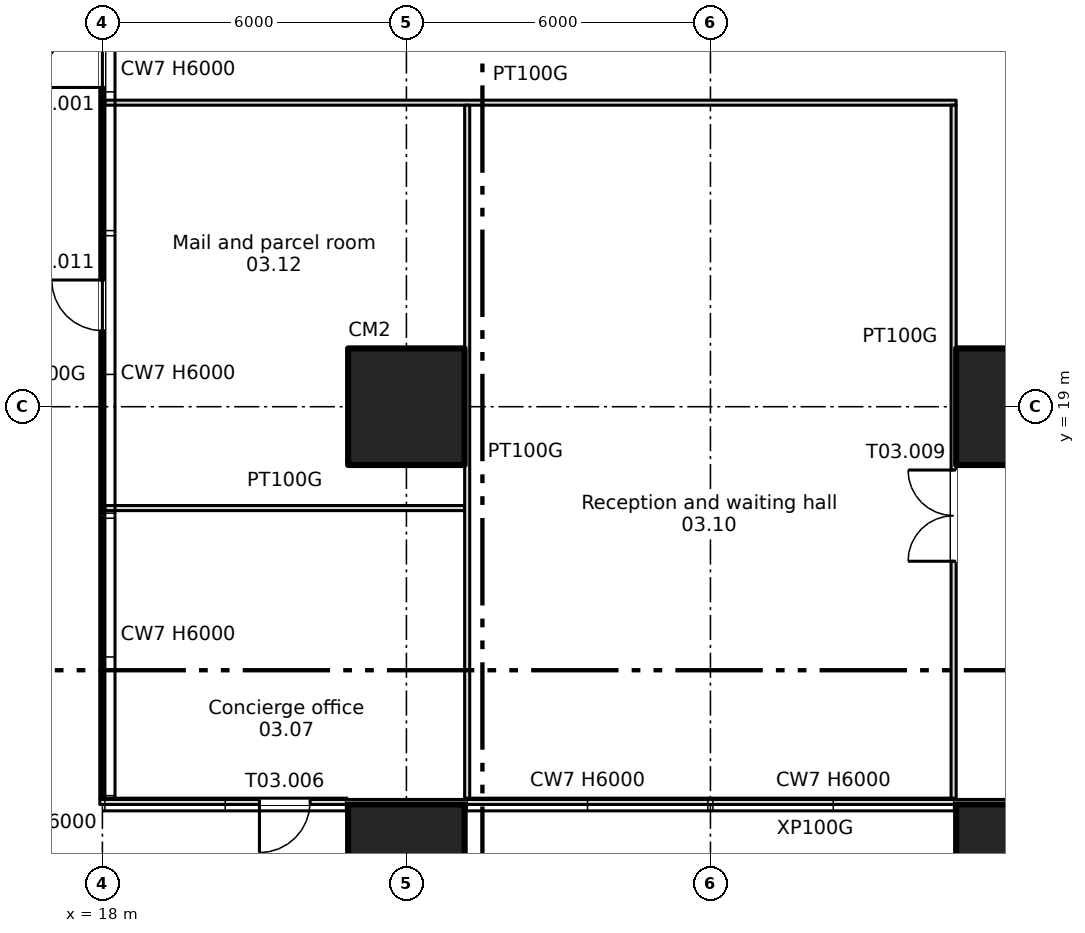
"""IFC4 building model, lengths in metres.
Left out: names, types, materials, properties, quantities, classifications, styles, units other than length and angle.
Written with IfcOpenShell. Run it as: python <this file> out.ifc"""

import sys

from ifc_helpers import new_model, si_unit, direction, frame, frame_2d, origin, origin_2d, place, context, subcontext, project, spatial, rectangle, extrude, element, fill, save


model = new_model("IFC4")
c1 = context("Model", 3, precision=1e-05, world=origin(), true_north=direction((0.0, 1.0)))
c2 = subcontext(c1, "Body", "Model", "MODEL_VIEW")
j1 = project(units=[si_unit("LENGTHUNIT", "METRE"), si_unit("PLANEANGLEUNIT", "RADIAN")], contexts=[c1])
p1 = place(None, origin())
s1 = spatial("IfcSite", under=j1, at=p1, CompositionType="ELEMENT")
p2 = place(p1, origin())
s2 = spatial("IfcBuilding", under=s1, at=p2, CompositionType="ELEMENT")
p3 = place(p2, origin())
s3 = spatial("IfcBuildingStorey", under=s2, at=p3, CompositionType="ELEMENT", Elevation=0.0)
for number, where, z_axis, x_axis in (
    (1, (24.0, 10.0, 0.0), (0.0, 0.0, 1.0), (1.0, 0.0, 0.0)),
    (2, (24.0, 19.0, 0.0), (0.0, 0.0, 1.0), (1.0, 0.0, 0.0)),
    (3, (36.0, 10.0, 0.0), (0.0, 0.0, 1.0), (1.0, 0.0, 0.0)),
    (4, (36.0, 19.0, 0.0), (0.0, 0.0, 1.0), (1.0, 0.0, 0.0)),
):
    element("IfcColumn", number, at=place(p3, frame(where, z_axis=z_axis, x_axis=x_axis)), inside=s3, PredefinedType="COLUMN", context=c2, shape_type="SweptSolid", body=[
        extrude(rectangle(XDim=2.3, YDim=2.3, at=origin_2d()), origin(), (0.0, 0.0, 1.0), 6.0),
    ])
p4 = place(p3, frame((17.95, 11.2, 0.0), z_axis=(0.0, 0.0, 1.0), x_axis=(1.0, 0.0, 0.0)))
e5 = element("IfcWall", 5, at=p4, inside=s3, PredefinedType="PARTITIONING", context=c2, shape_type="SweptSolid", body=[
    extrude(rectangle(XDim=24.2, YDim=0.1, at=frame_2d((12.1, 0.0))), origin(), (0.0, 0.0, 1.0), 6.0),
])
p5 = place(p4, frame((19.4, 0.0, 0.0)))
e6 = element("IfcOpeningElement", 6, at=p5, cuts=e5, PredefinedType="OPENING", context=c2, shape_type="SweptSolid", body=[
    extrude(rectangle(XDim=2.4, YDim=2.1, at=frame_2d((1.2, 1.05))), frame((0.0, 0.06, 0.0), z_axis=(0.0, -1.0, 0.0), x_axis=(1.0, 0.0, 0.0)), (0.0, 0.0, 1.0), 0.12),
])
p6 = place(p4, frame((3.15, 0.0, 0.0)))
e7 = element("IfcOpeningElement", 7, at=p6, cuts=e5, PredefinedType="OPENING", context=c2, shape_type="SweptSolid", body=[
    extrude(rectangle(XDim=1.0, YDim=2.1, at=frame_2d((0.5, 1.05))), frame((0.0, 0.06, 0.0), z_axis=(0.0, -1.0, 0.0), x_axis=(1.0, 0.0, 0.0)), (0.0, 0.0, 1.0), 0.12),
])
p7 = place(p3, frame((18.05, 17.0, 0.0), z_axis=(0.0, 0.0, 1.0), x_axis=(1.0, 0.0, 0.0)))
e8 = element("IfcWall", 8, at=p7, inside=s3, PredefinedType="PARTITIONING", context=c2, shape_type="SweptSolid", body=[
    extrude(rectangle(XDim=7.1, YDim=0.1, at=frame_2d((3.55, 0.0))), origin(), (0.0, 0.0, 1.0), 6.0),
])
p8 = place(p3, frame((18.05, 25.0, 0.0), z_axis=(0.0, 0.0, 1.0), x_axis=(1.0, 0.0, 0.0)))
e9 = element("IfcWall", 9, at=p8, inside=s3, PredefinedType="PARTITIONING", context=c2, shape_type="SweptSolid", body=[
    extrude(rectangle(XDim=16.8, YDim=0.1, at=frame_2d((8.4, 0.0))), origin(), (0.0, 0.0, 1.0), 6.0),
])
p9 = place(p3, frame((18.0, 11.25, 0.0), z_axis=(0.0, 0.0, 1.0), x_axis=(0.0, 1.0, 0.0)))
e10 = element("IfcWall", 10, at=p9, inside=s3, PredefinedType="PARTITIONING", context=c2, shape_type="SweptSolid", body=[
    extrude(rectangle(XDim=16.75, YDim=0.1, at=frame_2d((8.375, 0.0))), origin(), (0.0, 0.0, 1.0), 6.0),
])
p10 = place(p9, frame((14.05, 0.0, 0.0)))
e11 = element("IfcOpeningElement", 11, at=p10, cuts=e10, PredefinedType="OPENING", context=c2, shape_type="SweptSolid", body=[
    extrude(rectangle(XDim=2.4, YDim=2.1, at=frame_2d((1.2, 1.05))), frame((0.0, 0.06, 0.0), z_axis=(0.0, -1.0, 0.0), x_axis=(1.0, 0.0, 0.0)), (0.0, 0.0, 1.0), 0.12),
])
p11 = place(p9, frame((9.25, 0.0, 0.0)))
e12 = element("IfcOpeningElement", 12, at=p11, cuts=e10, PredefinedType="OPENING", context=c2, shape_type="SweptSolid", body=[
    extrude(rectangle(XDim=1.0, YDim=2.1, at=frame_2d((0.5, 1.05))), frame((0.0, 0.06, 0.0), z_axis=(0.0, -1.0, 0.0), x_axis=(1.0, 0.0, 0.0)), (0.0, 0.0, 1.0), 0.12),
])
p12 = place(p3, frame((25.2, 11.25, 0.0), z_axis=(0.0, 0.0, 1.0), x_axis=(0.0, 1.0, 0.0)))
e13 = element("IfcWall", 13, at=p12, inside=s3, PredefinedType="PARTITIONING", context=c2, shape_type="SweptSolid", body=[
    extrude(rectangle(XDim=13.7, YDim=0.1, at=frame_2d((6.85, 0.0))), origin(), (0.0, 0.0, 1.0), 6.0),
])
p13 = place(p3, frame((34.8, 11.25, 0.0), z_axis=(0.0, 0.0, 1.0), x_axis=(0.0, 1.0, 0.0)))
e14 = element("IfcWall", 14, at=p13, inside=s3, PredefinedType="PARTITIONING", context=c2, shape_type="SweptSolid", body=[
    extrude(rectangle(XDim=13.7, YDim=0.1, at=frame_2d((6.85, 0.0))), origin(), (0.0, 0.0, 1.0), 6.0),
])
p14 = place(p13, frame((4.7, 0.0, 0.0)))
e15 = element("IfcOpeningElement", 15, at=p14, cuts=e14, PredefinedType="OPENING", context=c2, shape_type="SweptSolid", body=[
    extrude(rectangle(XDim=1.8, YDim=2.1, at=frame_2d((0.9, 1.05))), frame((0.0, 0.06, 0.0), z_axis=(0.0, -1.0, 0.0), x_axis=(1.0, 0.0, 0.0)), (0.0, 0.0, 1.0), 0.12),
])
p15 = place(p10, origin())
e16 = element("IfcDoor", 16, at=p15, inside=s3, OperationType="DOUBLE_DOOR_SINGLE_SWING", PredefinedType="DOOR", context=c2, shape_type="SweptSolid", body=[
    extrude(rectangle(XDim=2.4, YDim=2.1, at=frame_2d((1.2, 1.05))), frame((0.0, 0.025, 0.0), z_axis=(0.0, -1.0, 0.0), x_axis=(1.0, 0.0, 0.0)), (0.0, 0.0, 1.0), 0.05),
])
fill(e11, e16)
p16 = place(p6, frame((1.0, 0.0, 0.0), z_axis=(0.0, 0.0, 1.0), x_axis=(-1.0, 0.0, 0.0)))
e17 = element("IfcDoor", 17, at=p16, inside=s3, OperationType="SINGLE_SWING_RIGHT", PredefinedType="DOOR", context=c2, shape_type="SweptSolid", body=[
    extrude(rectangle(XDim=1.0, YDim=2.1, at=frame_2d((0.5, 1.05))), frame((0.0, 0.025, 0.0), z_axis=(0.0, -1.0, 0.0), x_axis=(1.0, 0.0, 0.0)), (0.0, 0.0, 1.0), 0.05),
])
fill(e7, e17)
p17 = place(p14, origin())
e18 = element("IfcDoor", 18, at=p17, inside=s3, OperationType="DOUBLE_DOOR_SINGLE_SWING", PredefinedType="DOOR", context=c2, shape_type="SweptSolid", body=[
    extrude(rectangle(XDim=1.8, YDim=2.1, at=frame_2d((0.9, 1.05))), frame((0.0, 0.025, 0.0), z_axis=(0.0, -1.0, 0.0), x_axis=(1.0, 0.0, 0.0)), (0.0, 0.0, 1.0), 0.05),
])
fill(e15, e18)
p18 = place(p11, origin())
e19 = element("IfcDoor", 19, at=p18, inside=s3, OperationType="SINGLE_SWING_RIGHT", PredefinedType="DOOR", context=c2, shape_type="SweptSolid", body=[
    extrude(rectangle(XDim=1.0, YDim=2.1, at=frame_2d((0.5, 1.05))), frame((0.0, 0.025, 0.0), z_axis=(0.0, -1.0, 0.0), x_axis=(1.0, 0.0, 0.0)), (0.0, 0.0, 1.0), 0.05),
])
fill(e12, e19)
save(model, sys.argv[1])
